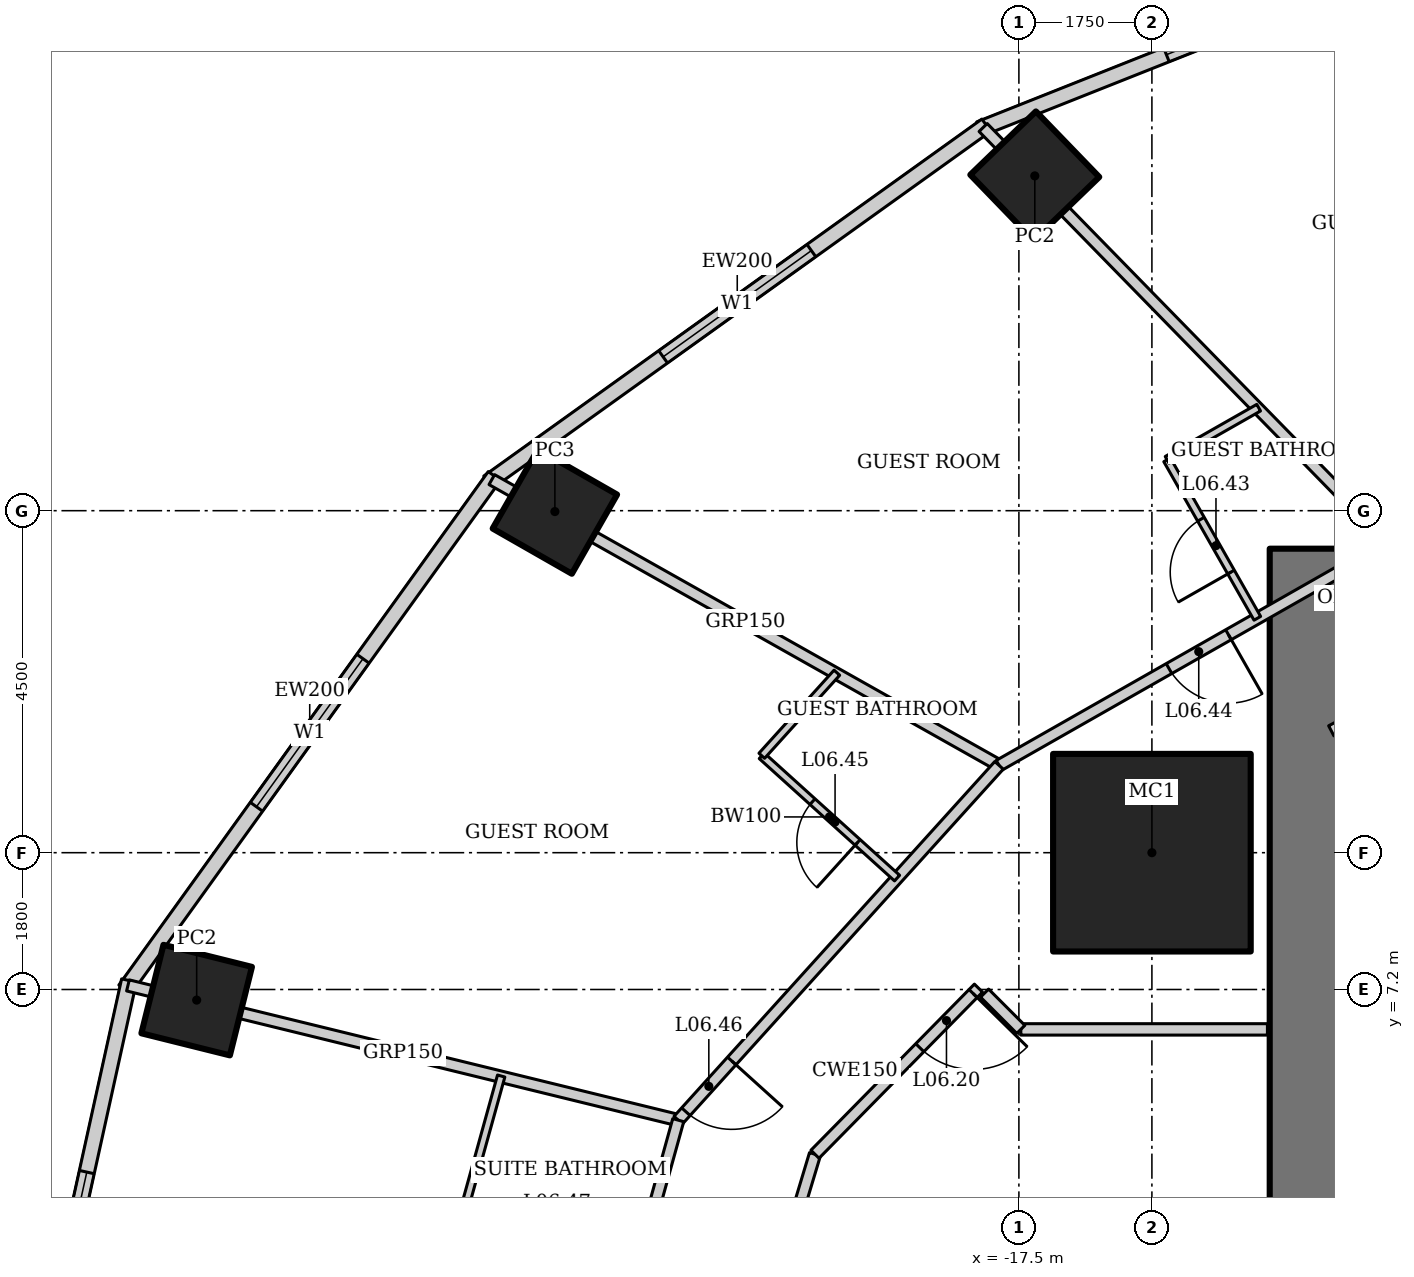
"""IFC4 building model, lengths in metres.
Left out: names, types, materials, properties, quantities, classifications, styles, units other than length and angle.
Written with IfcOpenShell. Run it as: python <this file> out.ifc"""

import sys

from ifc_helpers import new_model, si_unit, direction, frame, frame_2d, origin, origin_2d, place, context, subcontext, project, spatial, rectangle, hollow_rectangle, extrude, element, fill, save


model = new_model("IFC4")
c1 = context("Model", 3, precision=1e-05, world=origin(), true_north=direction((0.0, 1.0)))
c2 = subcontext(c1, "Body", "Model", "MODEL_VIEW")
j1 = project(units=[si_unit("LENGTHUNIT", "METRE"), si_unit("PLANEANGLEUNIT", "RADIAN")], contexts=[c1])
p1 = place(None, origin())
s1 = spatial("IfcSite", under=j1, at=p1, CompositionType="ELEMENT")
p2 = place(p1, origin())
s2 = spatial("IfcBuilding", under=s1, at=p2, CompositionType="ELEMENT")
p3 = place(p2, frame((0.0, 0.0, 37.0)))
s3 = spatial("IfcBuildingStorey", under=s2, at=p3, CompositionType="ELEMENT", Elevation=37.0)
p4 = place(p3, frame((-15.75, 9.0, 0.0), z_axis=(0.0, 0.0, 1.0), x_axis=(1.0, 0.0, 0.0)))
e1 = element("IfcColumn", 1, at=p4, inside=s3, PredefinedType="COLUMN", context=c2, shape_type="SweptSolid", body=[
    extrude(hollow_rectangle(XDim=2.6, YDim=2.6, WallThickness=0.13, at=origin_2d()), origin(), (0.0, 0.0, 1.0), 3.6),
])
p5 = place(p3, frame((-17.291, 17.905, 0.0), z_axis=(0.0, 0.0, 1.0), x_axis=(0.719339800339, 0.694658370459, 0.0)))
e2 = element("IfcColumn", 2, at=p5, inside=s3, PredefinedType="COLUMN", context=c2, shape_type="SweptSolid", body=[
    extrude(hollow_rectangle(XDim=1.2, YDim=1.2, WallThickness=0.1, at=origin_2d()), origin(), (0.0, 0.0, 1.0), 3.6),
])
p6 = place(p3, frame((-23.605, 13.489, 0.0), z_axis=(0.0, 0.0, 1.0), x_axis=(0.496139221777, 0.86824298017, 0.0)))
e3 = element("IfcColumn", 3, at=p6, inside=s3, PredefinedType="COLUMN", context=c2, shape_type="SweptSolid", body=[
    extrude(hollow_rectangle(XDim=1.2, YDim=1.2, WallThickness=0.12, at=origin_2d()), origin(), (0.0, 0.0, 1.0), 3.6),
])
p7 = place(p3, frame((-28.318, 7.06, 0.0), z_axis=(0.0, 0.0, 1.0), x_axis=(0.2419218956, 0.970295726276, 0.0)))
e4 = element("IfcColumn", 4, at=p7, inside=s3, PredefinedType="COLUMN", context=c2, shape_type="SweptSolid", body=[
    extrude(hollow_rectangle(XDim=1.2, YDim=1.2, WallThickness=0.1, at=origin_2d()), origin(), (0.0, 0.0, 1.0), 3.6),
])
p8 = place(p3, frame((-13.2, 13.0, 0.0), z_axis=(0.0, 0.0, 1.0), x_axis=(0.0, -1.0, 0.0)))
e5 = element("IfcWall", 5, at=p8, inside=s3, PredefinedType="SHEAR", context=c2, shape_type="SweptSolid", body=[
    extrude(rectangle(XDim=26.0, YDim=2.0, at=frame_2d((13.0, 0.0))), origin(), (0.0, 0.0, 1.0), 3.6),
])
p9 = place(p8, frame((12.1, 0.0, 0.0)))
e6 = element("IfcOpeningElement", 6, at=p9, cuts=e5, PredefinedType="OPENING", context=c2, shape_type="SweptSolid", body=[
    extrude(rectangle(XDim=1.8, YDim=2.1, at=frame_2d((0.9, 1.05))), frame((0.0, 1.01, 0.0), z_axis=(0.0, -1.0, 0.0), x_axis=(1.0, 0.0, 0.0)), (0.0, 0.0, 1.0), 2.02),
])
p10 = place(p3, frame((-10.869, 21.363, 0.0), z_axis=(0.0, 0.0, 1.0), x_axis=(-0.929358351251, -0.369178892895, 0.0)))
e7 = element("IfcWall", 7, at=p10, inside=s3, PredefinedType="SOLIDWALL", context=c2, shape_type="SweptSolid", body=[
    extrude(rectangle(XDim=7.692, YDim=0.2, at=frame_2d((3.846, 0.0))), origin(), (0.0, 0.0, 1.0), 3.45),
])
p11 = place(p10, frame((2.646, 0.0, 0.5)))
e8 = element("IfcOpeningElement", 8, at=p11, cuts=e7, PredefinedType="OPENING", context=c2, shape_type="SweptSolid", body=[
    extrude(rectangle(XDim=2.4, YDim=2.2, at=frame_2d((1.2, 1.1))), frame((0.0, 0.11, 0.0), z_axis=(0.0, -1.0, 0.0), x_axis=(1.0, 0.0, 0.0)), (0.0, 0.0, 1.0), 0.22),
])
p12 = place(p3, frame((-17.929, 18.572, 0.0), z_axis=(0.0, 0.0, 1.0), x_axis=(-0.812791321576, -0.582554948112, 0.0)))
e9 = element("IfcWall", 9, at=p12, inside=s3, PredefinedType="SOLIDWALL", context=c2, shape_type="SweptSolid", body=[
    extrude(rectangle(XDim=8.063, YDim=0.2, at=frame_2d((4.032, 0.0))), origin(), (0.0, 0.0, 1.0), 3.45),
])
p13 = place(p12, frame((2.832, 0.0, 0.5)))
e10 = element("IfcOpeningElement", 10, at=p13, cuts=e9, PredefinedType="OPENING", context=c2, shape_type="SweptSolid", body=[
    extrude(rectangle(XDim=2.4, YDim=2.2, at=frame_2d((1.2, 1.1))), frame((0.0, 0.11, 0.0), z_axis=(0.0, -1.0, 0.0), x_axis=(1.0, 0.0, 0.0)), (0.0, 0.0, 1.0), 0.22),
])
p14 = place(p3, frame((-24.4, 13.957, 0.0), z_axis=(0.0, 0.0, 1.0), x_axis=(-0.583937613703, -0.811798536155, 0.0)))
e11 = element("IfcWall", 11, at=p14, inside=s3, PredefinedType="SOLIDWALL", context=c2, shape_type="SweptSolid", body=[
    extrude(rectangle(XDim=8.323, YDim=0.2, at=frame_2d((4.162, 0.0))), origin(), (0.0, 0.0, 1.0), 3.45),
])
p15 = place(p14, frame((2.961, 0.0, 0.5)))
e12 = element("IfcOpeningElement", 12, at=p15, cuts=e11, PredefinedType="OPENING", context=c2, shape_type="SweptSolid", body=[
    extrude(rectangle(XDim=2.4, YDim=2.2, at=frame_2d((1.2, 1.1))), frame((0.0, 0.11, 0.0), z_axis=(0.0, -1.0, 0.0), x_axis=(1.0, 0.0, 0.0)), (0.0, 0.0, 1.0), 0.22),
])
p16 = place(p3, frame((-29.208, 7.318, 0.0), z_axis=(0.0, 0.0, 1.0), x_axis=(-0.215238065514, -0.976561608478, 0.0)))
e13 = element("IfcWall", 13, at=p16, inside=s3, PredefinedType="SOLIDWALL", context=c2, shape_type="SweptSolid", body=[
    extrude(rectangle(XDim=7.562, YDim=0.2, at=frame_2d((3.781, 0.0))), origin(), (0.0, 0.0, 1.0), 3.45),
])
p17 = place(p16, frame((2.581, 0.0, 0.5)))
e14 = element("IfcOpeningElement", 14, at=p17, cuts=e13, PredefinedType="OPENING", context=c2, shape_type="SweptSolid", body=[
    extrude(rectangle(XDim=2.4, YDim=2.2, at=frame_2d((1.2, 1.1))), frame((0.0, 0.11, 0.0), z_axis=(0.0, -1.0, 0.0), x_axis=(1.0, 0.0, 0.0)), (0.0, 0.0, 1.0), 0.22),
])
p18 = place(p3, frame((-17.97, 18.542, 0.0), z_axis=(0.0, 0.0, 1.0), x_axis=(0.699032031211, -0.715090357467, 0.0)))
e15 = element("IfcWall", 15, at=p18, inside=s3, PredefinedType="PARTITIONING", context=c2, shape_type="SweptSolid", body=[
    extrude(rectangle(XDim=7.647, YDim=0.15, at=frame_2d((3.824, 0.0))), origin(), (0.0, 0.0, 1.0), 2.528),
])
p19 = place(p3, frame((-24.435, 13.909, 0.0), z_axis=(0.0, 0.0, 1.0), x_axis=(0.871267209855, -0.490808974074, 0.0)))
e16 = element("IfcWall", 16, at=p19, inside=s3, PredefinedType="PARTITIONING", context=c2, shape_type="SweptSolid", body=[
    extrude(rectangle(XDim=7.659, YDim=0.15, at=frame_2d((3.83, 0.0))), origin(), (0.0, 0.0, 1.0), 2.693),
])
p20 = place(p3, frame((-29.222, 7.254, 0.0), z_axis=(0.0, 0.0, 1.0), x_axis=(0.97130070913, -0.237854855832, 0.0)))
e17 = element("IfcWall", 17, at=p20, inside=s3, PredefinedType="PARTITIONING", context=c2, shape_type="SweptSolid", body=[
    extrude(rectangle(XDim=7.454, YDim=0.15, at=frame_2d((3.727, 0.0))), origin(), (0.0, 0.0, 1.0), 2.333),
])
p21 = place(p3, frame((-12.625, 13.073, 0.0), z_axis=(0.0, 0.0, 1.0), x_axis=(-0.86907565943, -0.494679187136, 0.0)))
e18 = element("IfcWall", 18, at=p21, inside=s3, PredefinedType="PARTITIONING", context=c2, shape_type="SweptSolid", body=[
    extrude(rectangle(XDim=5.911, YDim=0.15, at=frame_2d((2.955, 0.0))), origin(), (0.0, 0.0, 1.0), 3.45),
])
p22 = place(p21, frame((2.437, 0.0, 0.0)))
e19 = element("IfcOpeningElement", 19, at=p22, cuts=e18, PredefinedType="OPENING", context=c2, shape_type="SweptSolid", body=[
    extrude(rectangle(XDim=0.9, YDim=2.1, at=frame_2d((0.45, 1.05))), frame((0.0, 0.085, 0.0), z_axis=(0.0, -1.0, 0.0), x_axis=(1.0, 0.0, 0.0)), (0.0, 0.0, 1.0), 0.17),
])
p23 = place(p3, frame((-17.761, 10.149, 0.0), z_axis=(0.0, 0.0, 1.0), x_axis=(-0.670598380282, -0.741820606591, 0.0)))
e20 = element("IfcWall", 20, at=p23, inside=s3, PredefinedType="PARTITIONING", context=c2, shape_type="SweptSolid", body=[
    extrude(rectangle(XDim=6.293, YDim=0.15, at=frame_2d((3.147, 0.0))), origin(), (0.0, 0.0, 1.0), 3.45),
])
p24 = place(p23, frame((5.244, 0.0, 0.0)))
e21 = element("IfcOpeningElement", 21, at=p24, cuts=e20, PredefinedType="OPENING", context=c2, shape_type="SweptSolid", body=[
    extrude(rectangle(XDim=0.9, YDim=2.1, at=frame_2d((0.45, 1.05))), frame((0.0, 0.085, 0.0), z_axis=(0.0, -1.0, 0.0), x_axis=(1.0, 0.0, 0.0)), (0.0, 0.0, 1.0), 0.17),
])
p25 = place(p3, frame((-21.982, 5.481, 0.0), z_axis=(0.0, 0.0, 1.0), x_axis=(-0.266933062421, -0.963715072097, 0.0)))
e22 = element("IfcWall", 22, at=p25, inside=s3, PredefinedType="PARTITIONING", context=c2, shape_type="SweptSolid", body=[
    extrude(rectangle(XDim=5.687, YDim=0.15, at=frame_2d((2.844, 0.0))), origin(), (0.0, 0.0, 1.0), 3.45),
])
p26 = place(p3, frame((-20.183, 5.032, 0.0), z_axis=(0.0, 0.0, 1.0), x_axis=(-0.288603524054, -0.957448696225, 0.0)))
e23 = element("IfcWall", 23, at=p26, inside=s3, PredefinedType="PARTITIONING", context=c2, shape_type="SweptSolid", body=[
    extrude(rectangle(XDim=4.316, YDim=0.15, at=frame_2d((2.158, 0.0))), origin(), (0.0, 0.0, 1.0), 3.45),
])
p27 = place(p3, frame((-14.363, 12.084, 0.0), z_axis=(0.0, 0.0, 1.0), x_axis=(-0.494703113698, 0.869062039959, 0.0)))
e24 = element("IfcWall", 24, at=p27, inside=s3, PredefinedType="PARTITIONING", context=c2, shape_type="SweptSolid", body=[
    extrude(rectangle(XDim=2.4, YDim=0.1, at=frame_2d((1.2, 0.0))), origin(), (0.0, 0.0, 1.0), 3.45),
])
p28 = place(p27, frame((0.7, 0.0, 0.0)))
e25 = element("IfcOpeningElement", 25, at=p28, cuts=e24, PredefinedType="OPENING", context=c2, shape_type="SweptSolid", body=[
    extrude(rectangle(XDim=0.8, YDim=2.1, at=frame_2d((0.4, 1.05))), frame((0.0, 0.06, 0.0), z_axis=(0.0, -1.0, 0.0), x_axis=(1.0, 0.0, 0.0)), (0.0, 0.0, 1.0), 0.12),
])
p29 = place(p3, frame((-15.55, 14.17, 0.0), z_axis=(0.0, 0.0, 1.0), x_axis=(0.869065896633, 0.494696338485, 0.0)))
e26 = element("IfcWall", 26, at=p29, inside=s3, PredefinedType="PARTITIONING", context=c2, shape_type="SweptSolid", body=[
    extrude(rectangle(XDim=1.386, YDim=0.1, at=frame_2d((0.693, 0.0))), origin(), (0.0, 0.0, 1.0), 3.45),
])
p30 = place(p3, frame((-19.103, 8.666, 0.0), z_axis=(0.0, 0.0, 1.0), x_axis=(-0.741861025859, 0.670553665496, 0.0)))
e27 = element("IfcWall", 27, at=p30, inside=s3, PredefinedType="PARTITIONING", context=c2, shape_type="SweptSolid", body=[
    extrude(rectangle(XDim=2.4, YDim=0.1, at=frame_2d((1.2, 0.0))), origin(), (0.0, 0.0, 1.0), 3.45),
])
p31 = place(p30, frame((0.7, 0.0, 0.0)))
e28 = element("IfcOpeningElement", 28, at=p31, cuts=e27, PredefinedType="OPENING", context=c2, shape_type="SweptSolid", body=[
    extrude(rectangle(XDim=0.8, YDim=2.1, at=frame_2d((0.4, 1.05))), frame((0.0, 0.06, 0.0), z_axis=(0.0, -1.0, 0.0), x_axis=(1.0, 0.0, 0.0)), (0.0, 0.0, 1.0), 0.12),
])
p32 = place(p3, frame((-20.883, 10.275, 0.0), z_axis=(0.0, 0.0, 1.0), x_axis=(0.670592268759, 0.7418261313, 0.0)))
e29 = element("IfcWall", 29, at=p32, inside=s3, PredefinedType="PARTITIONING", context=c2, shape_type="SweptSolid", body=[
    extrude(rectangle(XDim=1.474, YDim=0.1, at=frame_2d((0.737, 0.0))), origin(), (0.0, 0.0, 1.0), 3.45),
])
p33 = place(p3, frame((-24.829, 4.194, 0.0), z_axis=(0.0, 0.0, 1.0), x_axis=(0.266942084007, 0.963712573222, 0.0)))
e30 = element("IfcWall", 30, at=p33, inside=s3, PredefinedType="PARTITIONING", context=c2, shape_type="SweptSolid", body=[
    extrude(rectangle(XDim=1.938, YDim=0.1, at=frame_2d((0.969, 0.0))), origin(), (0.0, 0.0, 1.0), 3.45),
])
p34 = place(p3, frame((-11.296, 11.698, 0.0), z_axis=(0.0, 0.0, 1.0), x_axis=(-0.886306431218, -0.463099244203, 0.0)))
e31 = element("IfcWall", 31, at=p34, inside=s3, PredefinedType="PARTITIONING", context=c2, shape_type="SweptSolid", body=[
    extrude(rectangle(XDim=2.362, YDim=0.15, at=frame_2d((1.181, 0.0))), origin(), (0.0, 0.0, 1.0), 3.45),
])
p35 = place(p3, frame((-18.032, 7.218, 0.0), z_axis=(0.0, 0.0, 1.0), x_axis=(-0.701392176983, -0.712775570616, 0.0)))
e32 = element("IfcWall", 32, at=p35, inside=s3, PredefinedType="PARTITIONING", context=c2, shape_type="SweptSolid", body=[
    extrude(rectangle(XDim=3.067, YDim=0.15, at=frame_2d((1.533, 0.0))), origin(), (0.0, 0.0, 1.0), 3.45),
])
p36 = place(p35, frame((0.1, 0.0, 0.0)))
e33 = element("IfcOpeningElement", 33, at=p36, cuts=e32, PredefinedType="OPENING", context=c2, shape_type="SweptSolid", body=[
    extrude(rectangle(XDim=1.0, YDim=2.1, at=frame_2d((0.5, 1.05))), frame((0.0, 0.085, 0.0), z_axis=(0.0, -1.0, 0.0), x_axis=(1.0, 0.0, 0.0)), (0.0, 0.0, 1.0), 0.17),
])
p37 = place(p3, frame((-14.23, 6.675, 0.0), z_axis=(0.0, 0.0, 1.0), x_axis=(-1.0, 0.0, 0.0)))
e34 = element("IfcWall", 34, at=p37, inside=s3, PredefinedType="PARTITIONING", context=c2, shape_type="SweptSolid", body=[
    extrude(rectangle(XDim=3.245, YDim=0.15, at=frame_2d((1.622, 0.0))), origin(), (0.0, 0.0, 1.0), 3.45),
])
p38 = place(p3, frame((-17.475, 6.675, 0.0), z_axis=(0.0, 0.0, 1.0), x_axis=(-0.707106781187, 0.707106781187, 0.0)))
e35 = element("IfcWall", 35, at=p38, inside=s3, PredefinedType="PARTITIONING", context=c2, shape_type="SweptSolid", body=[
    extrude(rectangle(XDim=0.675, YDim=0.15, at=frame_2d((0.337, 0.0))), origin(), (0.0, 0.0, 1.0), 3.45),
])
p39 = place(p11, origin())
e36 = element("IfcWindow", 36, at=p39, inside=s3, PartitioningType="SINGLE_PANEL", PredefinedType="WINDOW", context=c2, shape_type="SweptSolid", body=[
    extrude(rectangle(XDim=2.4, YDim=2.2, at=frame_2d((1.2, 1.1))), frame((0.0, 0.03, 0.0), z_axis=(0.0, -1.0, 0.0), x_axis=(1.0, 0.0, 0.0)), (0.0, 0.0, 1.0), 0.06),
])
fill(e8, e36)
p40 = place(p13, origin())
e37 = element("IfcWindow", 37, at=p40, inside=s3, PartitioningType="SINGLE_PANEL", PredefinedType="WINDOW", context=c2, shape_type="SweptSolid", body=[
    extrude(rectangle(XDim=2.4, YDim=2.2, at=frame_2d((1.2, 1.1))), frame((0.0, 0.03, 0.0), z_axis=(0.0, -1.0, 0.0), x_axis=(1.0, 0.0, 0.0)), (0.0, 0.0, 1.0), 0.06),
])
fill(e10, e37)
p41 = place(p15, origin())
e38 = element("IfcWindow", 38, at=p41, inside=s3, PartitioningType="SINGLE_PANEL", PredefinedType="WINDOW", context=c2, shape_type="SweptSolid", body=[
    extrude(rectangle(XDim=2.4, YDim=2.2, at=frame_2d((1.2, 1.1))), frame((0.0, 0.03, 0.0), z_axis=(0.0, -1.0, 0.0), x_axis=(1.0, 0.0, 0.0)), (0.0, 0.0, 1.0), 0.06),
])
fill(e12, e38)
p42 = place(p17, origin())
e39 = element("IfcWindow", 39, at=p42, inside=s3, PartitioningType="SINGLE_PANEL", PredefinedType="WINDOW", context=c2, shape_type="SweptSolid", body=[
    extrude(rectangle(XDim=2.4, YDim=2.2, at=frame_2d((1.2, 1.1))), frame((0.0, 0.03, 0.0), z_axis=(0.0, -1.0, 0.0), x_axis=(1.0, 0.0, 0.0)), (0.0, 0.0, 1.0), 0.06),
])
fill(e14, e39)
p43 = place(p36, origin())
e40 = element("IfcDoor", 40, at=p43, inside=s3, OperationType="SINGLE_SWING_LEFT", PredefinedType="DOOR", context=c2, shape_type="SweptSolid", body=[
    extrude(rectangle(XDim=1.0, YDim=2.1, at=frame_2d((0.5, 1.05))), frame((0.0, 0.025, 0.0), z_axis=(0.0, -1.0, 0.0), x_axis=(1.0, 0.0, 0.0)), (0.0, 0.0, 1.0), 0.05),
])
fill(e33, e40)
p44 = place(p28, origin())
e41 = element("IfcDoor", 41, at=p44, inside=s3, OperationType="SINGLE_SWING_LEFT", PredefinedType="DOOR", context=c2, shape_type="SweptSolid", body=[
    extrude(rectangle(XDim=0.8, YDim=2.1, at=frame_2d((0.4, 1.05))), frame((0.0, 0.025, 0.0), z_axis=(0.0, -1.0, 0.0), x_axis=(1.0, 0.0, 0.0)), (0.0, 0.0, 1.0), 0.05),
])
fill(e25, e41)
p45 = place(p22, origin())
e42 = element("IfcDoor", 42, at=p45, inside=s3, OperationType="SINGLE_SWING_LEFT", PredefinedType="DOOR", context=c2, shape_type="SweptSolid", body=[
    extrude(rectangle(XDim=0.9, YDim=2.1, at=frame_2d((0.45, 1.05))), frame((0.0, 0.025, 0.0), z_axis=(0.0, -1.0, 0.0), x_axis=(1.0, 0.0, 0.0)), (0.0, 0.0, 1.0), 0.05),
])
fill(e19, e42)
p46 = place(p31, origin())
e43 = element("IfcDoor", 43, at=p46, inside=s3, OperationType="SINGLE_SWING_LEFT", PredefinedType="DOOR", context=c2, shape_type="SweptSolid", body=[
    extrude(rectangle(XDim=0.8, YDim=2.1, at=frame_2d((0.4, 1.05))), frame((0.0, 0.025, 0.0), z_axis=(0.0, -1.0, 0.0), x_axis=(1.0, 0.0, 0.0)), (0.0, 0.0, 1.0), 0.05),
])
fill(e28, e43)
p47 = place(p24, origin())
e44 = element("IfcDoor", 44, at=p47, inside=s3, OperationType="SINGLE_SWING_LEFT", PredefinedType="DOOR", context=c2, shape_type="SweptSolid", body=[
    extrude(rectangle(XDim=0.9, YDim=2.1, at=frame_2d((0.45, 1.05))), frame((0.0, 0.025, 0.0), z_axis=(0.0, -1.0, 0.0), x_axis=(1.0, 0.0, 0.0)), (0.0, 0.0, 1.0), 0.05),
])
fill(e21, e44)
save(model, sys.argv[1])
